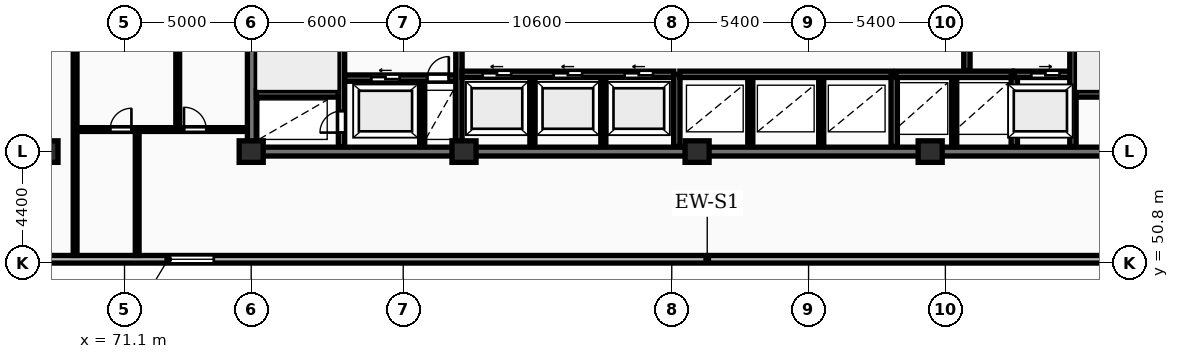
"""IFC4 building model, lengths in metres.
Left out: names, types, materials, properties, quantities, classifications, styles, units other than length and angle.
Written with IfcOpenShell. Run it as: python <this file> out.ifc"""

import sys

from ifc_helpers import new_model, si_unit, direction, frame, frame_2d, origin, origin_2d, place, context, subcontext, project, spatial, rectangle, extrude, element, fill, save


model = new_model("IFC4")
c1 = context("Model", 3, precision=1e-05, world=origin(), true_north=direction((0.0, 1.0)))
c2 = subcontext(c1, "Body", "Model", "MODEL_VIEW")
j1 = project(units=[si_unit("LENGTHUNIT", "METRE"), si_unit("PLANEANGLEUNIT", "RADIAN")], contexts=[c1])
p1 = place(None, origin())
s1 = spatial("IfcSite", under=j1, at=p1, CompositionType="ELEMENT")
p2 = place(p1, origin())
s2 = spatial("IfcBuilding", under=s1, at=p2, CompositionType="ELEMENT")
p3 = place(p2, frame((0.0, 0.0, 87.3)))
s3 = spatial("IfcBuildingStorey", under=s2, at=p3, CompositionType="ELEMENT", Elevation=87.3)
for number, where, z_axis, x_axis in (
    (1, (68.0, 55.2, 0.0), (0.0, 0.0, 1.0), (1.0, 0.0, 0.0)),
    (2, (76.1, 55.2, 0.0), (0.0, 0.0, 1.0), (1.0, 0.0, 0.0)),
    (3, (84.5, 55.2, 0.0), (0.0, 0.0, 1.0), (1.0, 0.0, 0.0)),
    (4, (93.7, 55.2, 0.0), (0.0, 0.0, 1.0), (1.0, 0.0, 0.0)),
    (5, (102.9, 55.2, 0.0), (0.0, 0.0, 1.0), (1.0, 0.0, 0.0)),
):
    element("IfcColumn", number, at=place(p3, frame(where, z_axis=z_axis, x_axis=x_axis)), inside=s3, PredefinedType="COLUMN", context=c2, shape_type="SweptSolid", body=[
        extrude(rectangle(XDim=0.95, YDim=0.85, at=origin_2d()), origin(), (0.0, 0.0, 1.0), 3.25),
    ])
p4 = place(p3, frame((57.6, 50.95, 0.0), z_axis=(0.0, 0.0, 1.0), x_axis=(1.0, 0.0, 0.0)))
e6 = element("IfcWall", 6, at=p4, inside=s3, PredefinedType="STANDARD", context=c2, shape_type="SweptSolid", body=[
    extrude(rectangle(XDim=73.0, YDim=0.3, at=frame_2d((36.5, 0.0))), origin(), (0.0, 0.0, 1.0), 2.97),
])
p5 = place(p4, frame((15.225, 0.0, 0.85)))
e7 = element("IfcOpeningElement", 7, at=p5, cuts=e6, PredefinedType="OPENING", context=c2, shape_type="SweptSolid", body=[
    extrude(rectangle(XDim=1.8, YDim=1.8, at=frame_2d((0.9, 0.9))), frame((0.0, 0.16, 0.0), z_axis=(0.0, -1.0, 0.0), x_axis=(1.0, 0.0, 0.0)), (0.0, 0.0, 1.0), 0.32),
])
p6 = place(p4, frame((58.575, 0.0, 0.85)))
e8 = element("IfcOpeningElement", 8, at=p6, cuts=e6, PredefinedType="OPENING", context=c2, shape_type="SweptSolid", body=[
    extrude(rectangle(XDim=1.8, YDim=1.8, at=frame_2d((0.9, 0.9))), frame((0.0, 0.16, 0.0), z_axis=(0.0, -1.0, 0.0), x_axis=(1.0, 0.0, 0.0)), (0.0, 0.0, 1.0), 0.32),
])
p7 = place(p3, frame((75.95, 55.2, 0.0), z_axis=(0.0, 0.0, 1.0), x_axis=(1.0, 0.0, 0.0)))
e9 = element("IfcWall", 9, at=p7, inside=s3, PredefinedType="SHEAR", context=c2, shape_type="SweptSolid", body=[
    extrude(rectangle(XDim=36.3, YDim=0.35, at=frame_2d((18.15, 0.0))), origin(), (0.0, 0.0, 1.0), 3.25),
])
p8 = place(p3, frame((76.125, 55.375, 0.0), z_axis=(0.0, 0.0, 1.0), x_axis=(0.0, 1.0, 0.0)))
e10 = element("IfcWall", 10, at=p8, inside=s3, PredefinedType="SHEAR", context=c2, shape_type="SweptSolid", body=[
    extrude(rectangle(XDim=11.65, YDim=0.35, at=frame_2d((5.825, 0.0))), origin(), (0.0, 0.0, 1.0), 3.25),
])
p9 = place(p3, frame((79.665, 55.4, 0.0), z_axis=(0.0, 0.0, 1.0), x_axis=(0.0, 1.0, 0.0)))
e11 = element("IfcWall", 11, at=p9, inside=s3, PredefinedType="SHEAR", context=c2, shape_type="SweptSolid", body=[
    extrude(rectangle(XDim=11.6, YDim=0.25, at=frame_2d((5.8, 0.0))), origin(), (0.0, 0.0, 1.0), 3.25),
])
p10 = place(p9, frame((0.55, 0.0, 0.0)))
e12 = element("IfcOpeningElement", 12, at=p10, cuts=e11, PredefinedType="OPENING", context=c2, shape_type="SweptSolid", body=[
    extrude(rectangle(XDim=0.85, YDim=2.05, at=frame_2d((0.425, 1.025))), frame((0.0, 0.135, 0.0), z_axis=(0.0, -1.0, 0.0), x_axis=(1.0, 0.0, 0.0)), (0.0, 0.0, 1.0), 0.27),
])
p11 = place(p9, frame((8.4, 0.0, 0.0)))
e13 = element("IfcOpeningElement", 13, at=p11, cuts=e11, PredefinedType="OPENING", context=c2, shape_type="SweptSolid", body=[
    extrude(rectangle(XDim=1.1, YDim=2.1, at=frame_2d((0.55, 1.05))), frame((0.0, 0.135, 0.0), z_axis=(0.0, -1.0, 0.0), x_axis=(1.0, 0.0, 0.0)), (0.0, 0.0, 1.0), 0.27),
])
p12 = place(p9, frame((10.25, 0.0, 0.0)))
e14 = element("IfcOpeningElement", 14, at=p12, cuts=e11, PredefinedType="OPENING", context=c2, shape_type="SweptSolid", body=[
    extrude(rectangle(XDim=0.85, YDim=2.05, at=frame_2d((0.425, 1.025))), frame((0.0, 0.135, 0.0), z_axis=(0.0, -1.0, 0.0), x_axis=(1.0, 0.0, 0.0)), (0.0, 0.0, 1.0), 0.27),
])
p13 = place(p3, frame((76.3, 57.475, 0.0), z_axis=(0.0, 0.0, 1.0), x_axis=(1.0, 0.0, 0.0)))
e15 = element("IfcWall", 15, at=p13, inside=s3, PredefinedType="SHEAR", context=c2, shape_type="SweptSolid", body=[
    extrude(rectangle(XDim=3.24, YDim=0.25, at=frame_2d((1.62, 0.0))), origin(), (0.0, 0.0, 1.0), 3.25),
])
p14 = place(p3, frame((79.79, 58.1, 0.0), z_axis=(0.0, 0.0, 1.0), x_axis=(1.0, 0.0, 0.0)))
e16 = element("IfcWall", 16, at=p14, inside=s3, PredefinedType="SHEAR", context=c2, shape_type="SweptSolid", body=[
    extrude(rectangle(XDim=4.39, YDim=0.25, at=frame_2d((2.195, 0.0))), origin(), (0.0, 0.0, 1.0), 3.25),
])
p15 = place(p14, frame((1.05, 0.0, 0.0)))
e17 = element("IfcOpeningElement", 17, at=p15, cuts=e16, PredefinedType="OPENING", context=c2, shape_type="SweptSolid", body=[
    extrude(rectangle(XDim=1.12, YDim=2.12, at=frame_2d((0.56, 1.06))), frame((0.0, 0.135, 0.0), z_axis=(0.0, -1.0, 0.0), x_axis=(1.0, 0.0, 0.0)), (0.0, 0.0, 1.0), 0.27),
])
p16 = place(p14, frame((3.26, 0.0, 0.0)))
e18 = element("IfcOpeningElement", 18, at=p16, cuts=e16, PredefinedType="OPENING", context=c2, shape_type="SweptSolid", body=[
    extrude(rectangle(XDim=0.85, YDim=2.05, at=frame_2d((0.425, 1.025))), frame((0.0, 0.135, 0.0), z_axis=(0.0, -1.0, 0.0), x_axis=(1.0, 0.0, 0.0)), (0.0, 0.0, 1.0), 0.27),
])
p17 = place(p3, frame((82.85, 55.4, 0.0), z_axis=(0.0, 0.0, 1.0), x_axis=(0.0, 1.0, 0.0)))
e19 = element("IfcWall", 19, at=p17, inside=s3, PredefinedType="PARTITIONING", context=c2, shape_type="SweptSolid", body=[
    extrude(rectangle(XDim=2.56, YDim=0.2, at=frame_2d((1.28, 0.0))), origin(), (0.0, 0.0, 1.0), 2.97),
])
p18 = place(p3, frame((84.3, 55.4, 0.0), z_axis=(0.0, 0.0, 1.0), x_axis=(0.0, 1.0, 0.0)))
e20 = element("IfcWall", 20, at=p18, inside=s3, PredefinedType="SHEAR", context=c2, shape_type="SweptSolid", body=[
    extrude(rectangle(XDim=11.6, YDim=0.25, at=frame_2d((5.8, 0.0))), origin(), (0.0, 0.0, 1.0), 3.25),
])
p19 = place(p18, frame((5.2, 0.0, 0.0)))
e21 = element("IfcOpeningElement", 21, at=p19, cuts=e20, PredefinedType="OPENING", context=c2, shape_type="SweptSolid", body=[
    extrude(rectangle(XDim=1.1, YDim=2.1, at=frame_2d((0.55, 1.05))), frame((0.0, 0.135, 0.0), z_axis=(0.0, -1.0, 0.0), x_axis=(1.0, 0.0, 0.0)), (0.0, 0.0, 1.0), 0.27),
])
for number, where, z_axis, x_axis in (
    (22, (87.2, 55.4, 0.0), (0.0, 0.0, 1.0), (0.0, 1.0, 0.0)),
    (23, (90.0, 55.4, 0.0), (0.0, 0.0, 1.0), (0.0, 1.0, 0.0)),
):
    element("IfcWall", number, at=place(p3, frame(where, z_axis=z_axis, x_axis=x_axis)), inside=s3, PredefinedType="PARTITIONING", context=c2, shape_type="SweptSolid", body=[
        extrude(rectangle(XDim=2.72, YDim=0.2, at=frame_2d((1.36, 0.0))), origin(), (0.0, 0.0, 1.0), 2.97),
    ])
p20 = place(p3, frame((84.42, 58.25, 0.0), z_axis=(0.0, 0.0, 1.0), x_axis=(1.0, 0.0, 0.0)))
e24 = element("IfcWall", 24, at=p20, inside=s3, PredefinedType="SHEAR", context=c2, shape_type="SweptSolid", body=[
    extrude(rectangle(XDim=8.36, YDim=0.25, at=frame_2d((4.18, 0.0))), origin(), (0.0, 0.0, 1.0), 3.25),
])
p21 = place(p20, frame((0.82, 0.0, 0.0)))
e25 = element("IfcOpeningElement", 25, at=p21, cuts=e24, PredefinedType="OPENING", context=c2, shape_type="SweptSolid", body=[
    extrude(rectangle(XDim=1.12, YDim=2.12, at=frame_2d((0.56, 1.06))), frame((0.0, 0.135, 0.0), z_axis=(0.0, -1.0, 0.0), x_axis=(1.0, 0.0, 0.0)), (0.0, 0.0, 1.0), 0.27),
])
p22 = place(p20, frame((3.62, 0.0, 0.0)))
e26 = element("IfcOpeningElement", 26, at=p22, cuts=e24, PredefinedType="OPENING", context=c2, shape_type="SweptSolid", body=[
    extrude(rectangle(XDim=1.12, YDim=2.12, at=frame_2d((0.56, 1.06))), frame((0.0, 0.135, 0.0), z_axis=(0.0, -1.0, 0.0), x_axis=(1.0, 0.0, 0.0)), (0.0, 0.0, 1.0), 0.27),
])
p23 = place(p20, frame((6.42, 0.0, 0.0)))
e27 = element("IfcOpeningElement", 27, at=p23, cuts=e24, PredefinedType="OPENING", context=c2, shape_type="SweptSolid", body=[
    extrude(rectangle(XDim=1.12, YDim=2.12, at=frame_2d((0.56, 1.06))), frame((0.0, 0.135, 0.0), z_axis=(0.0, -1.0, 0.0), x_axis=(1.0, 0.0, 0.0)), (0.0, 0.0, 1.0), 0.27),
])
p24 = place(p3, frame((92.9, 55.4, 0.0), z_axis=(0.0, 0.0, 1.0), x_axis=(0.0, 1.0, 0.0)))
e28 = element("IfcWall", 28, at=p24, inside=s3, PredefinedType="SHEAR", context=c2, shape_type="SweptSolid", body=[
    extrude(rectangle(XDim=2.85, YDim=0.25, at=frame_2d((1.425, 0.0))), origin(), (0.0, 0.0, 1.0), 3.25),
])
for number, where, z_axis, x_axis in (
    (29, (95.8, 55.4, 0.0), (0.0, 0.0, 1.0), (0.0, 1.0, 0.0)),
    (30, (98.6, 55.4, 0.0), (0.0, 0.0, 1.0), (0.0, 1.0, 0.0)),
):
    element("IfcWall", number, at=place(p3, frame(where, z_axis=z_axis, x_axis=x_axis)), inside=s3, PredefinedType="PARTITIONING", context=c2, shape_type="SweptSolid", body=[
        extrude(rectangle(XDim=2.72, YDim=0.2, at=frame_2d((1.36, 0.0))), origin(), (0.0, 0.0, 1.0), 2.97),
    ])
p25 = place(p3, frame((93.02, 58.25, 0.0), z_axis=(0.0, 0.0, 1.0), x_axis=(1.0, 0.0, 0.0)))
e31 = element("IfcWall", 31, at=p25, inside=s3, PredefinedType="SHEAR", context=c2, shape_type="SweptSolid", body=[
    extrude(rectangle(XDim=8.36, YDim=0.25, at=frame_2d((4.18, 0.0))), origin(), (0.0, 0.0, 1.0), 3.25),
])
p26 = place(p3, frame((101.48, 55.4, 0.0), z_axis=(0.0, 0.0, 1.0), x_axis=(0.0, 1.0, 0.0)))
e32 = element("IfcWall", 32, at=p26, inside=s3, PredefinedType="SHEAR", context=c2, shape_type="SweptSolid", body=[
    extrude(rectangle(XDim=2.85, YDim=0.25, at=frame_2d((1.425, 0.0))), origin(), (0.0, 0.0, 1.0), 3.25),
])
p27 = place(p3, frame((103.85, 55.4, 0.0), z_axis=(0.0, 0.0, 1.0), x_axis=(0.0, 1.0, 0.0)))
e33 = element("IfcWall", 33, at=p27, inside=s3, PredefinedType="PARTITIONING", context=c2, shape_type="SweptSolid", body=[
    extrude(rectangle(XDim=2.72, YDim=0.2, at=frame_2d((1.36, 0.0))), origin(), (0.0, 0.0, 1.0), 2.97),
])
p28 = place(p3, frame((101.55, 58.25, 0.0), z_axis=(0.0, 0.0, 1.0), x_axis=(1.0, 0.0, 0.0)))
e34 = element("IfcWall", 34, at=p28, inside=s3, PredefinedType="SHEAR", context=c2, shape_type="SweptSolid", body=[
    extrude(rectangle(XDim=4.6, YDim=0.25, at=frame_2d((2.3, 0.0))), origin(), (0.0, 0.0, 1.0), 3.25),
])
p29 = place(p3, frame((106.22, 55.4, 0.0), z_axis=(0.0, 0.0, 1.0), x_axis=(0.0, 1.0, 0.0)))
e35 = element("IfcWall", 35, at=p29, inside=s3, PredefinedType="SHEAR", context=c2, shape_type="SweptSolid", body=[
    extrude(rectangle(XDim=2.85, YDim=0.25, at=frame_2d((1.425, 0.0))), origin(), (0.0, 0.0, 1.0), 3.25),
])
p30 = place(p3, frame((106.22, 58.25, 0.0), z_axis=(0.0, 0.0, 1.0), x_axis=(1.0, 0.0, 0.0)))
e36 = element("IfcWall", 36, at=p30, inside=s3, PredefinedType="SHEAR", context=c2, shape_type="SweptSolid", body=[
    extrude(rectangle(XDim=2.46, YDim=0.25, at=frame_2d((1.23, 0.0))), origin(), (0.0, 0.0, 1.0), 3.25),
])
p31 = place(p30, frame((0.67, 0.0, 0.0)))
e37 = element("IfcOpeningElement", 37, at=p31, cuts=e36, PredefinedType="OPENING", context=c2, shape_type="SweptSolid", body=[
    extrude(rectangle(XDim=1.12, YDim=2.12, at=frame_2d((0.56, 1.06))), frame((0.0, 0.135, 0.0), z_axis=(0.0, -1.0, 0.0), x_axis=(1.0, 0.0, 0.0)), (0.0, 0.0, 1.0), 0.27),
])
p32 = place(p3, frame((104.35, 58.4, 0.0), z_axis=(0.0, 0.0, 1.0), x_axis=(0.0, 1.0, 0.0)))
e38 = element("IfcWall", 38, at=p32, inside=s3, PredefinedType="SHEAR", context=c2, shape_type="SweptSolid", body=[
    extrude(rectangle(XDim=8.6, YDim=0.25, at=frame_2d((4.3, 0.0))), origin(), (0.0, 0.0, 1.0), 3.25),
])
p33 = place(p32, frame((1.8, 0.0, 0.0)))
e39 = element("IfcOpeningElement", 39, at=p33, cuts=e38, PredefinedType="OPENING", context=c2, shape_type="SweptSolid", body=[
    extrude(rectangle(XDim=1.1, YDim=2.1, at=frame_2d((0.55, 1.05))), frame((0.0, 0.135, 0.0), z_axis=(0.0, -1.0, 0.0), x_axis=(1.0, 0.0, 0.0)), (0.0, 0.0, 1.0), 0.27),
])
p34 = place(p3, frame((108.535, 55.4, 0.0), z_axis=(0.0, 0.0, 1.0), x_axis=(0.0, 1.0, 0.0)))
e40 = element("IfcWall", 40, at=p34, inside=s3, PredefinedType="SHEAR", context=c2, shape_type="SweptSolid", body=[
    extrude(rectangle(XDim=11.6, YDim=0.25, at=frame_2d((5.8, 0.0))), origin(), (0.0, 0.0, 1.0), 3.25),
])
p35 = place(p34, frame((8.2, 0.0, 0.0)))
e41 = element("IfcOpeningElement", 41, at=p35, cuts=e40, PredefinedType="OPENING", context=c2, shape_type="SweptSolid", body=[
    extrude(rectangle(XDim=1.1, YDim=2.1, at=frame_2d((0.55, 1.05))), frame((0.0, 0.135, 0.0), z_axis=(0.0, -1.0, 0.0), x_axis=(1.0, 0.0, 0.0)), (0.0, 0.0, 1.0), 0.27),
])
p36 = place(p34, frame((10.25, 0.0, 0.0)))
e42 = element("IfcOpeningElement", 42, at=p36, cuts=e40, PredefinedType="OPENING", context=c2, shape_type="SweptSolid", body=[
    extrude(rectangle(XDim=0.85, YDim=2.05, at=frame_2d((0.425, 1.025))), frame((0.0, 0.135, 0.0), z_axis=(0.0, -1.0, 0.0), x_axis=(1.0, 0.0, 0.0)), (0.0, 0.0, 1.0), 0.27),
])
p37 = place(p3, frame((108.66, 57.475, 0.0), z_axis=(0.0, 0.0, 1.0), x_axis=(1.0, 0.0, 0.0)))
e43 = element("IfcWall", 43, at=p37, inside=s3, PredefinedType="SHEAR", context=c2, shape_type="SweptSolid", body=[
    extrude(rectangle(XDim=3.24, YDim=0.25, at=frame_2d((1.62, 0.0))), origin(), (0.0, 0.0, 1.0), 3.25),
])
p38 = place(p3, frame((69.15, 51.1, 0.0), z_axis=(0.0, 0.0, 1.0), x_axis=(0.0, 1.0, 0.0)))
e44 = element("IfcWall", 44, at=p38, inside=s3, PredefinedType="PARTITIONING", context=c2, shape_type="SweptSolid", body=[
    extrude(rectangle(XDim=16.05, YDim=0.15, at=frame_2d((8.025, 0.0))), origin(), (0.0, 0.0, 1.0), 2.97),
])
p39 = place(p38, frame((11.3, 0.0, 0.0)))
e45 = element("IfcOpeningElement", 45, at=p39, cuts=e44, PredefinedType="OPENING", context=c2, shape_type="SweptSolid", body=[
    extrude(rectangle(XDim=0.88, YDim=2.06, at=frame_2d((0.44, 1.03))), frame((0.0, 0.085, 0.0), z_axis=(0.0, -1.0, 0.0), x_axis=(1.0, 0.0, 0.0)), (0.0, 0.0, 1.0), 0.17),
])
p40 = place(p3, frame((73.2, 56.07, 0.0), z_axis=(0.0, 0.0, 1.0), x_axis=(0.0, 1.0, 0.0)))
e46 = element("IfcWall", 46, at=p40, inside=s3, PredefinedType="PARTITIONING", context=c2, shape_type="SweptSolid", body=[
    extrude(rectangle(XDim=11.08, YDim=0.15, at=frame_2d((5.54, 0.0))), origin(), (0.0, 0.0, 1.0), 2.97),
])
p41 = place(p40, frame((5.08, 0.0, 0.0)))
e47 = element("IfcOpeningElement", 47, at=p41, cuts=e46, PredefinedType="OPENING", context=c2, shape_type="SweptSolid", body=[
    extrude(rectangle(XDim=0.92, YDim=2.08, at=frame_2d((0.46, 1.04))), frame((0.0, 0.085, 0.0), z_axis=(0.0, -1.0, 0.0), x_axis=(1.0, 0.0, 0.0)), (0.0, 0.0, 1.0), 0.17),
])
p42 = place(p3, frame((71.6, 51.1, 0.0), z_axis=(0.0, 0.0, 1.0), x_axis=(0.0, 1.0, 0.0)))
e48 = element("IfcWall", 48, at=p42, inside=s3, PredefinedType="PARTITIONING", context=c2, shape_type="SweptSolid", body=[
    extrude(rectangle(XDim=4.97, YDim=0.15, at=frame_2d((2.485, 0.0))), origin(), (0.0, 0.0, 1.0), 2.97),
])
p43 = place(p3, frame((69.17, 56.07, 0.0), z_axis=(0.0, 0.0, 1.0), x_axis=(1.0, 0.0, 0.0)))
e49 = element("IfcWall", 49, at=p43, inside=s3, PredefinedType="PARTITIONING", context=c2, shape_type="SweptSolid", body=[
    extrude(rectangle(XDim=6.76, YDim=0.15, at=frame_2d((3.38, 0.0))), origin(), (0.0, 0.0, 1.0), 2.97),
])
p44 = place(p43, frame((1.362, 0.0, 0.0)))
e50 = element("IfcOpeningElement", 50, at=p44, cuts=e49, PredefinedType="OPENING", context=c2, shape_type="SweptSolid", body=[
    extrude(rectangle(XDim=0.84, YDim=2.04, at=frame_2d((0.42, 1.02))), frame((0.0, 0.085, 0.0), z_axis=(0.0, -1.0, 0.0), x_axis=(1.0, 0.0, 0.0)), (0.0, 0.0, 1.0), 0.17),
])
p45 = place(p43, frame((4.277, 0.0, 0.0)))
e51 = element("IfcOpeningElement", 51, at=p45, cuts=e49, PredefinedType="OPENING", context=c2, shape_type="SweptSolid", body=[
    extrude(rectangle(XDim=0.88, YDim=2.06, at=frame_2d((0.44, 1.03))), frame((0.0, 0.085, 0.0), z_axis=(0.0, -1.0, 0.0), x_axis=(1.0, 0.0, 0.0)), (0.0, 0.0, 1.0), 0.17),
])
p46 = place(p5, origin())
e52 = element("IfcWindow", 52, at=p46, inside=s3, PartitioningType="SINGLE_PANEL", PredefinedType="WINDOW", context=c2, shape_type="SweptSolid", body=[
    extrude(rectangle(XDim=1.8, YDim=1.8, at=frame_2d((0.9, 0.9))), frame((0.0, 0.03, 0.0), z_axis=(0.0, -1.0, 0.0), x_axis=(1.0, 0.0, 0.0)), (0.0, 0.0, 1.0), 0.06),
])
fill(e7, e52)
p47 = place(p10, origin())
e53 = element("IfcDoor", 53, at=p47, inside=s3, OperationType="SINGLE_SWING_LEFT", PredefinedType="DOOR", context=c2, shape_type="SweptSolid", body=[
    extrude(rectangle(XDim=0.85, YDim=2.05, at=frame_2d((0.425, 1.025))), frame((0.0, 0.025, 0.0), z_axis=(0.0, -1.0, 0.0), x_axis=(1.0, 0.0, 0.0)), (0.0, 0.0, 1.0), 0.05),
])
fill(e12, e53)
p48 = place(p15, origin())
e54 = element("IfcDoor", 54, at=p48, inside=s3, OperationType="SLIDING_TO_LEFT", PredefinedType="DOOR", context=c2, shape_type="SweptSolid", body=[
    extrude(rectangle(XDim=1.12, YDim=2.12, at=frame_2d((0.56, 1.06))), frame((0.0, 0.025, 0.0), z_axis=(0.0, -1.0, 0.0), x_axis=(1.0, 0.0, 0.0)), (0.0, 0.0, 1.0), 0.05),
])
fill(e17, e54)
p49 = place(p16, origin())
e55 = element("IfcDoor", 55, at=p49, inside=s3, OperationType="SINGLE_SWING_RIGHT", PredefinedType="DOOR", context=c2, shape_type="SweptSolid", body=[
    extrude(rectangle(XDim=0.85, YDim=2.05, at=frame_2d((0.425, 1.025))), frame((0.0, 0.025, 0.0), z_axis=(0.0, -1.0, 0.0), x_axis=(1.0, 0.0, 0.0)), (0.0, 0.0, 1.0), 0.05),
])
fill(e18, e55)
p50 = place(p21, origin())
e56 = element("IfcDoor", 56, at=p50, inside=s3, OperationType="SLIDING_TO_LEFT", PredefinedType="DOOR", context=c2, shape_type="SweptSolid", body=[
    extrude(rectangle(XDim=1.12, YDim=2.12, at=frame_2d((0.56, 1.06))), frame((0.0, 0.025, 0.0), z_axis=(0.0, -1.0, 0.0), x_axis=(1.0, 0.0, 0.0)), (0.0, 0.0, 1.0), 0.05),
])
fill(e25, e56)
p51 = place(p22, origin())
e57 = element("IfcDoor", 57, at=p51, inside=s3, OperationType="SLIDING_TO_LEFT", PredefinedType="DOOR", context=c2, shape_type="SweptSolid", body=[
    extrude(rectangle(XDim=1.12, YDim=2.12, at=frame_2d((0.56, 1.06))), frame((0.0, 0.025, 0.0), z_axis=(0.0, -1.0, 0.0), x_axis=(1.0, 0.0, 0.0)), (0.0, 0.0, 1.0), 0.05),
])
fill(e26, e57)
p52 = place(p23, origin())
e58 = element("IfcDoor", 58, at=p52, inside=s3, OperationType="SLIDING_TO_LEFT", PredefinedType="DOOR", context=c2, shape_type="SweptSolid", body=[
    extrude(rectangle(XDim=1.12, YDim=2.12, at=frame_2d((0.56, 1.06))), frame((0.0, 0.025, 0.0), z_axis=(0.0, -1.0, 0.0), x_axis=(1.0, 0.0, 0.0)), (0.0, 0.0, 1.0), 0.05),
])
fill(e27, e58)
p53 = place(p31, origin())
e59 = element("IfcDoor", 59, at=p53, inside=s3, OperationType="SLIDING_TO_RIGHT", PredefinedType="DOOR", context=c2, shape_type="SweptSolid", body=[
    extrude(rectangle(XDim=1.12, YDim=2.12, at=frame_2d((0.56, 1.06))), frame((0.0, 0.025, 0.0), z_axis=(0.0, -1.0, 0.0), x_axis=(1.0, 0.0, 0.0)), (0.0, 0.0, 1.0), 0.05),
])
fill(e37, e59)
p54 = place(p44, origin())
e60 = element("IfcDoor", 60, at=p54, inside=s3, OperationType="SINGLE_SWING_RIGHT", PredefinedType="DOOR", context=c2, shape_type="SweptSolid", body=[
    extrude(rectangle(XDim=0.84, YDim=2.04, at=frame_2d((0.42, 1.02))), frame((0.0, 0.025, 0.0), z_axis=(0.0, -1.0, 0.0), x_axis=(1.0, 0.0, 0.0)), (0.0, 0.0, 1.0), 0.05),
])
fill(e50, e60)
p55 = place(p45, origin())
e61 = element("IfcDoor", 61, at=p55, inside=s3, OperationType="SINGLE_SWING_LEFT", PredefinedType="DOOR", context=c2, shape_type="SweptSolid", body=[
    extrude(rectangle(XDim=0.88, YDim=2.06, at=frame_2d((0.44, 1.03))), frame((0.0, 0.025, 0.0), z_axis=(0.0, -1.0, 0.0), x_axis=(1.0, 0.0, 0.0)), (0.0, 0.0, 1.0), 0.05),
])
fill(e51, e61)
save(model, sys.argv[1])
